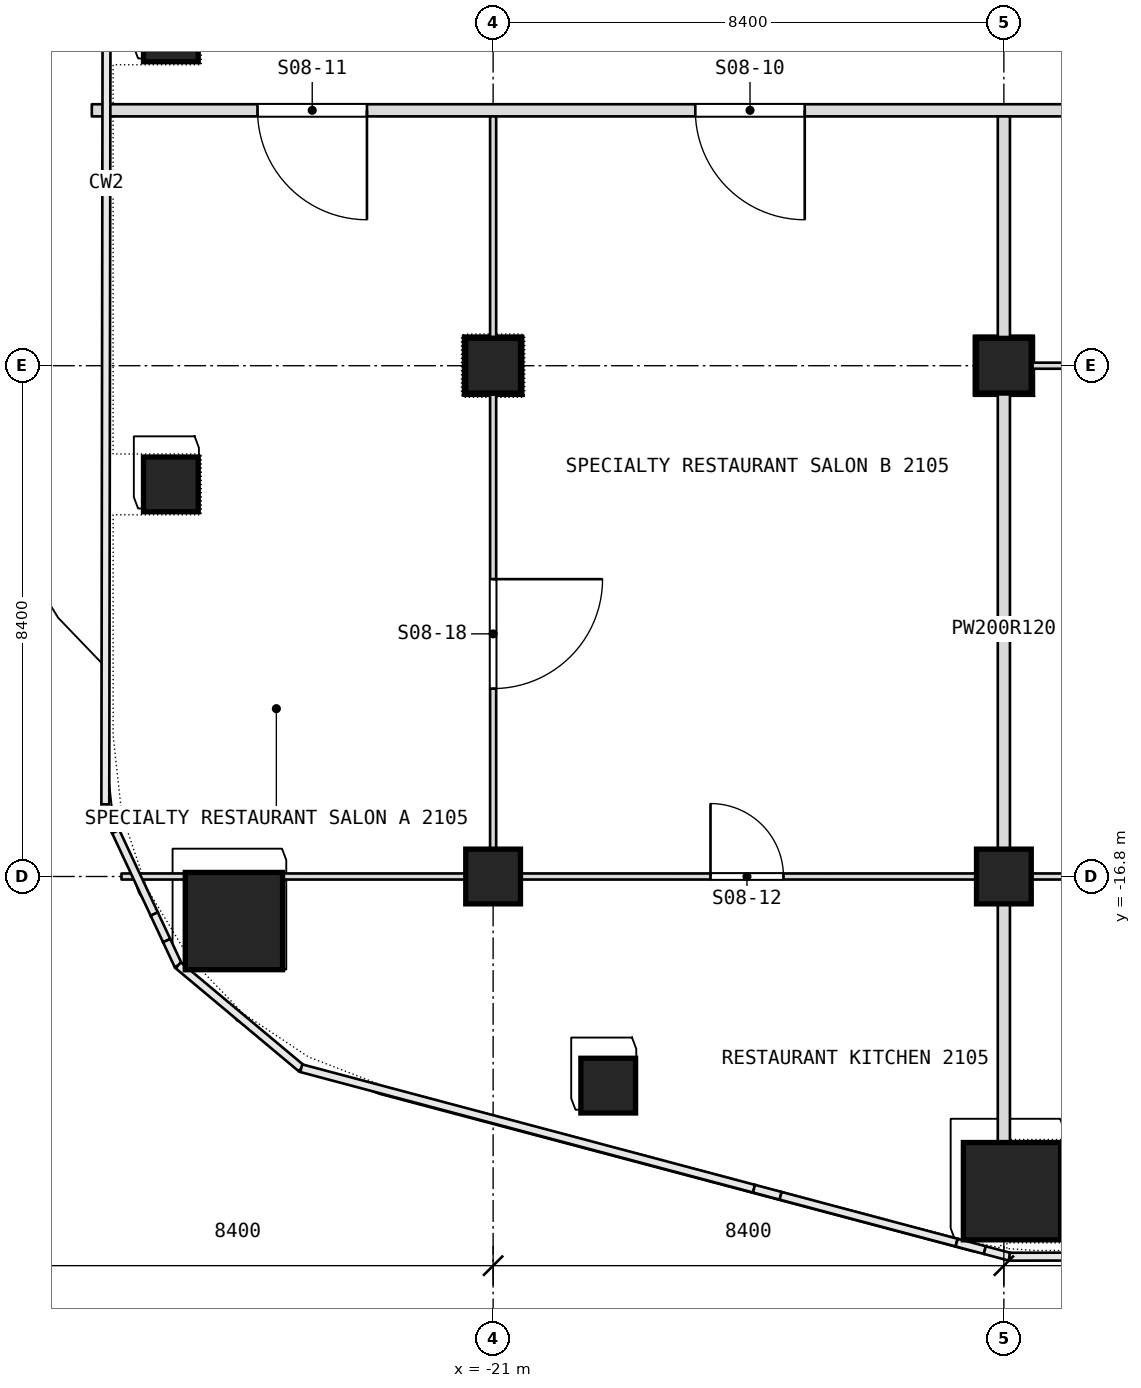
"""IFC4 building model, lengths in metres.
Left out: names, types, materials, properties, quantities, classifications, styles, units other than length and angle.
Written with IfcOpenShell. Run it as: python <this file> out.ifc"""

import sys

from ifc_helpers import new_model, si_unit, direction, frame, frame_2d, origin, origin_2d, place, context, subcontext, project, spatial, rectangle, extrude, element, fill, save


model = new_model("IFC4")
c1 = context("Model", 3, precision=1e-05, world=origin(), true_north=direction((0.0, 1.0)))
c2 = subcontext(c1, "Body", "Model", "MODEL_VIEW")
j1 = project(units=[si_unit("LENGTHUNIT", "METRE"), si_unit("PLANEANGLEUNIT", "RADIAN")], contexts=[c1])
p1 = place(None, origin())
s1 = spatial("IfcSite", under=j1, at=p1, CompositionType="ELEMENT")
p2 = place(p1, origin())
s2 = spatial("IfcBuilding", under=s1, at=p2, CompositionType="ELEMENT")
p3 = place(p2, frame((0.0, 0.0, 97.7)))
s3 = spatial("IfcBuildingStorey", under=s2, at=p3, CompositionType="ELEMENT", Elevation=97.7)
for number, where, z_axis, x_axis in (
    (1, (-25.263, -17.533, 0.0), (0.0, 0.0, 1.0), (1.0, 0.0, 0.0)),
    (2, (-12.466, -21.975, 0.0), (0.0, 0.0, 1.0), (1.0, 0.0, 0.0)),
):
    element("IfcColumn", number, at=place(p3, frame(where, z_axis=z_axis, x_axis=x_axis)), inside=s3, PredefinedType="COLUMN", context=c2, shape_type="SweptSolid", body=[
        extrude(rectangle(XDim=1.6, YDim=1.6, at=origin_2d()), origin(), (0.0, 0.0, 1.0), 7.2),
    ])
p4 = place(p3, frame((-21.0, -16.8, -0.26), z_axis=(0.0, 0.0, 1.0), x_axis=(1.0, 0.0, 0.0)))
e3 = element("IfcColumn", 3, at=p4, inside=s3, PredefinedType="COLUMN", context=c2, shape_type="SweptSolid", body=[
    extrude(rectangle(XDim=0.9, YDim=0.9, at=origin_2d()), origin(), (0.0, 0.0, 1.0), 7.46),
])
p5 = place(p3, frame((-21.0, -8.4, 0.0), z_axis=(0.0, 0.0, 1.0), x_axis=(1.0, 0.0, 0.0)))
e4 = element("IfcColumn", 4, at=p5, inside=s3, PredefinedType="COLUMN", context=c2, shape_type="SweptSolid", body=[
    extrude(rectangle(XDim=0.9, YDim=0.9, at=origin_2d()), origin(), (0.0, 0.0, 1.0), 7.2),
])
p6 = place(p3, frame((-12.6, -16.8, -0.26), z_axis=(0.0, 0.0, 1.0), x_axis=(1.0, 0.0, 0.0)))
e5 = element("IfcColumn", 5, at=p6, inside=s3, PredefinedType="COLUMN", context=c2, shape_type="SweptSolid", body=[
    extrude(rectangle(XDim=0.9, YDim=0.9, at=origin_2d()), origin(), (0.0, 0.0, 1.0), 7.46),
])
for number, where, z_axis, x_axis in (
    (6, (-12.6, -8.4, 0.0), (0.0, 0.0, 1.0), (1.0, 0.0, 0.0)),
    (7, (-26.3, -10.352, 0.0), (0.0, 0.0, 1.0), (1.0, 0.0, 0.0)),
    (8, (-26.3, -2.951, 0.0), (0.0, 0.0, 1.0), (1.0, 0.0, 0.0)),
    (9, (-19.107, -20.239, 0.0), (0.0, 0.0, 1.0), (1.0, 0.0, 0.0)),
):
    element("IfcColumn", number, at=place(p3, frame(where, z_axis=z_axis, x_axis=x_axis)), inside=s3, PredefinedType="COLUMN", context=c2, shape_type="SweptSolid", body=[
        extrude(rectangle(XDim=0.9, YDim=0.9, at=origin_2d()), origin(), (0.0, 0.0, 1.0), 7.2),
    ])
p7 = place(p3, frame((-27.112, -16.8, 0.0), z_axis=(0.0, 0.0, 1.0), x_axis=(1.0, 0.0, 0.0)))
e10 = element("IfcWall", 10, at=p7, inside=s3, PredefinedType="PARTITIONING", context=c2, shape_type="SweptSolid", body=[
    extrude(rectangle(XDim=1.049, YDim=0.1, at=frame_2d((0.524, 0.0))), origin(), (0.0, 0.0, 1.0), 6.94),
])
p8 = place(p3, frame((-24.463, -16.8, 0.0), z_axis=(0.0, 0.0, 1.0), x_axis=(1.0, 0.0, 0.0)))
e11 = element("IfcWall", 11, at=p8, inside=s3, PredefinedType="PARTITIONING", context=c2, shape_type="SweptSolid", body=[
    extrude(rectangle(XDim=37.163, YDim=0.1, at=frame_2d((18.582, 0.0))), origin(), (0.0, 0.0, 1.0), 6.49),
])
p9 = place(p8, frame((7.038, 0.0, 0.0)))
e12 = element("IfcOpeningElement", 12, at=p9, cuts=e11, PredefinedType="OPENING", context=c2, shape_type="SweptSolid", body=[
    extrude(rectangle(XDim=1.2, YDim=2.1, at=frame_2d((0.6, 1.05))), frame((0.0, 0.05, 0.0), z_axis=(0.0, -1.0, 0.0), x_axis=(1.0, 0.0, 0.0)), (0.0, 0.0, 1.0), 0.1),
])
p10 = place(p8, frame((24.063, 0.0, 0.0)))
e13 = element("IfcOpeningElement", 13, at=p10, cuts=e11, PredefinedType="OPENING", context=c2, shape_type="SweptSolid", body=[
    extrude(rectangle(XDim=1.0, YDim=2.1, at=frame_2d((0.5, 1.05))), frame((0.0, 0.05, 0.0), z_axis=(0.0, -1.0, 0.0), x_axis=(1.0, 0.0, 0.0)), (0.0, 0.0, 1.0), 0.1),
])
p11 = place(p3, frame((-12.5, -8.4, 0.0), z_axis=(0.0, 0.0, 1.0), x_axis=(1.0, 0.0, 0.0)))
e14 = element("IfcWall", 14, at=p11, inside=s3, PredefinedType="PARTITIONING", context=c2, shape_type="SweptSolid", body=[
    extrude(rectangle(XDim=7.83, YDim=0.1, at=frame_2d((3.915, 0.0))), origin(), (0.0, 0.0, 1.0), 6.49),
])
p12 = place(p3, frame((-27.6, -4.2, 0.0), z_axis=(0.0, 0.0, 1.0), x_axis=(1.0, 0.0, 0.0)))
e15 = element("IfcWall", 15, at=p12, inside=s3, PredefinedType="PARTITIONING", context=c2, shape_type="SweptSolid", body=[
    extrude(rectangle(XDim=55.2, YDim=0.2, at=frame_2d((27.6, 0.0))), origin(), (0.0, 0.0, 1.0), 6.94),
])
p13 = place(p12, frame((9.925, 0.0, 0.0)))
e16 = element("IfcOpeningElement", 16, at=p13, cuts=e15, PredefinedType="OPENING", context=c2, shape_type="SweptSolid", body=[
    extrude(rectangle(XDim=1.8, YDim=2.1, at=frame_2d((0.9, 1.05))), frame((0.0, 0.1, 0.0), z_axis=(0.0, -1.0, 0.0), x_axis=(1.0, 0.0, 0.0)), (0.0, 0.0, 1.0), 0.2),
])
p14 = place(p12, frame((2.725, 0.0, 0.0)))
e17 = element("IfcOpeningElement", 17, at=p14, cuts=e15, PredefinedType="OPENING", context=c2, shape_type="SweptSolid", body=[
    extrude(rectangle(XDim=1.8, YDim=2.1, at=frame_2d((0.9, 1.05))), frame((0.0, 0.1, 0.0), z_axis=(0.0, -1.0, 0.0), x_axis=(1.0, 0.0, 0.0)), (0.0, 0.0, 1.0), 0.2),
])
p15 = place(p12, frame((26.65, 0.0, 0.0)))
e18 = element("IfcOpeningElement", 18, at=p15, cuts=e15, PredefinedType="OPENING", context=c2, shape_type="SweptSolid", body=[
    extrude(rectangle(XDim=1.8, YDim=2.1, at=frame_2d((0.9, 1.05))), frame((0.0, 0.1, 0.0), z_axis=(0.0, -1.0, 0.0), x_axis=(1.0, 0.0, 0.0)), (0.0, 0.0, 1.0), 0.2),
])
p16 = place(p12, frame((43.525, 0.0, 0.0)))
e19 = element("IfcOpeningElement", 19, at=p16, cuts=e15, PredefinedType="OPENING", context=c2, shape_type="SweptSolid", body=[
    extrude(rectangle(XDim=1.8, YDim=2.1, at=frame_2d((0.9, 1.05))), frame((0.0, 0.1, 0.0), z_axis=(0.0, -1.0, 0.0), x_axis=(1.0, 0.0, 0.0)), (0.0, 0.0, 1.0), 0.2),
])
p17 = place(p12, frame((50.675, 0.0, 0.0)))
e20 = element("IfcOpeningElement", 20, at=p17, cuts=e15, PredefinedType="OPENING", context=c2, shape_type="SweptSolid", body=[
    extrude(rectangle(XDim=1.8, YDim=2.1, at=frame_2d((0.9, 1.05))), frame((0.0, 0.1, 0.0), z_axis=(0.0, -1.0, 0.0), x_axis=(1.0, 0.0, 0.0)), (0.0, 0.0, 1.0), 0.2),
])
p18 = place(p3, frame((-12.6, -21.175, 0.0), z_axis=(0.0, 0.0, 1.0), x_axis=(0.0, 1.0, 0.0)))
e21 = element("IfcWall", 21, at=p18, inside=s3, PredefinedType="PARTITIONING", context=c2, shape_type="SweptSolid", body=[
    extrude(rectangle(XDim=16.875, YDim=0.2, at=frame_2d((8.438, 0.0))), origin(), (0.0, 0.0, 1.0), 6.94),
])
p19 = place(p3, frame((-21.0, -16.75, 0.0), z_axis=(0.0, 0.0, 1.0), x_axis=(0.0, 1.0, 0.0)))
e22 = element("IfcWall", 22, at=p19, inside=s3, PredefinedType="PARTITIONING", context=c2, shape_type="SweptSolid", body=[
    extrude(rectangle(XDim=7.88, YDim=0.1, at=frame_2d((3.94, 0.0))), origin(), (0.0, 0.0, 1.0), 6.94),
])
p20 = place(p19, frame((3.04, 0.0, 0.0)))
e23 = element("IfcOpeningElement", 23, at=p20, cuts=e22, PredefinedType="OPENING", context=c2, shape_type="SweptSolid", body=[
    extrude(rectangle(XDim=1.8, YDim=2.1, at=frame_2d((0.9, 1.05))), frame((0.0, 0.05, 0.0), z_axis=(0.0, -1.0, 0.0), x_axis=(1.0, 0.0, 0.0)), (0.0, 0.0, 1.0), 0.1),
])
p21 = place(p3, frame((-21.0, -7.93, 0.0), z_axis=(0.0, 0.0, 1.0), x_axis=(0.0, 1.0, 0.0)))
e24 = element("IfcWall", 24, at=p21, inside=s3, PredefinedType="PARTITIONING", context=c2, shape_type="SweptSolid", body=[
    extrude(rectangle(XDim=3.63, YDim=0.1, at=frame_2d((1.815, 0.0))), origin(), (0.0, 0.0, 1.0), 6.94),
])
p22 = place(p9, origin())
e25 = element("IfcDoor", 25, at=p22, inside=s3, OperationType="SINGLE_SWING_RIGHT", PredefinedType="DOOR", context=c2, shape_type="SweptSolid", body=[
    extrude(rectangle(XDim=1.2, YDim=2.1, at=frame_2d((0.6, 1.05))), frame((0.0, 0.025, 0.0), z_axis=(0.0, -1.0, 0.0), x_axis=(1.0, 0.0, 0.0)), (0.0, 0.0, 1.0), 0.05),
])
fill(e12, e25)
p23 = place(p13, origin())
e26 = element("IfcDoor", 26, at=p23, inside=s3, OperationType="DOUBLE_DOOR_SINGLE_SWING", PredefinedType="DOOR", context=c2, shape_type="SweptSolid", body=[
    extrude(rectangle(XDim=1.8, YDim=2.1, at=frame_2d((0.9, 1.05))), frame((0.0, 0.025, 0.0), z_axis=(0.0, -1.0, 0.0), x_axis=(1.0, 0.0, 0.0)), (0.0, 0.0, 1.0), 0.05),
])
fill(e16, e26)
p24 = place(p14, origin())
e27 = element("IfcDoor", 27, at=p24, inside=s3, OperationType="DOUBLE_DOOR_SINGLE_SWING", PredefinedType="DOOR", context=c2, shape_type="SweptSolid", body=[
    extrude(rectangle(XDim=1.8, YDim=2.1, at=frame_2d((0.9, 1.05))), frame((0.0, 0.025, 0.0), z_axis=(0.0, -1.0, 0.0), x_axis=(1.0, 0.0, 0.0)), (0.0, 0.0, 1.0), 0.05),
])
fill(e17, e27)
p25 = place(p20, origin())
e28 = element("IfcDoor", 28, at=p25, inside=s3, OperationType="DOUBLE_DOOR_SINGLE_SWING", PredefinedType="DOOR", context=c2, shape_type="SweptSolid", body=[
    extrude(rectangle(XDim=1.8, YDim=2.1, at=frame_2d((0.9, 1.05))), frame((0.0, 0.025, 0.0), z_axis=(0.0, -1.0, 0.0), x_axis=(1.0, 0.0, 0.0)), (0.0, 0.0, 1.0), 0.05),
])
fill(e23, e28)
save(model, sys.argv[1])
